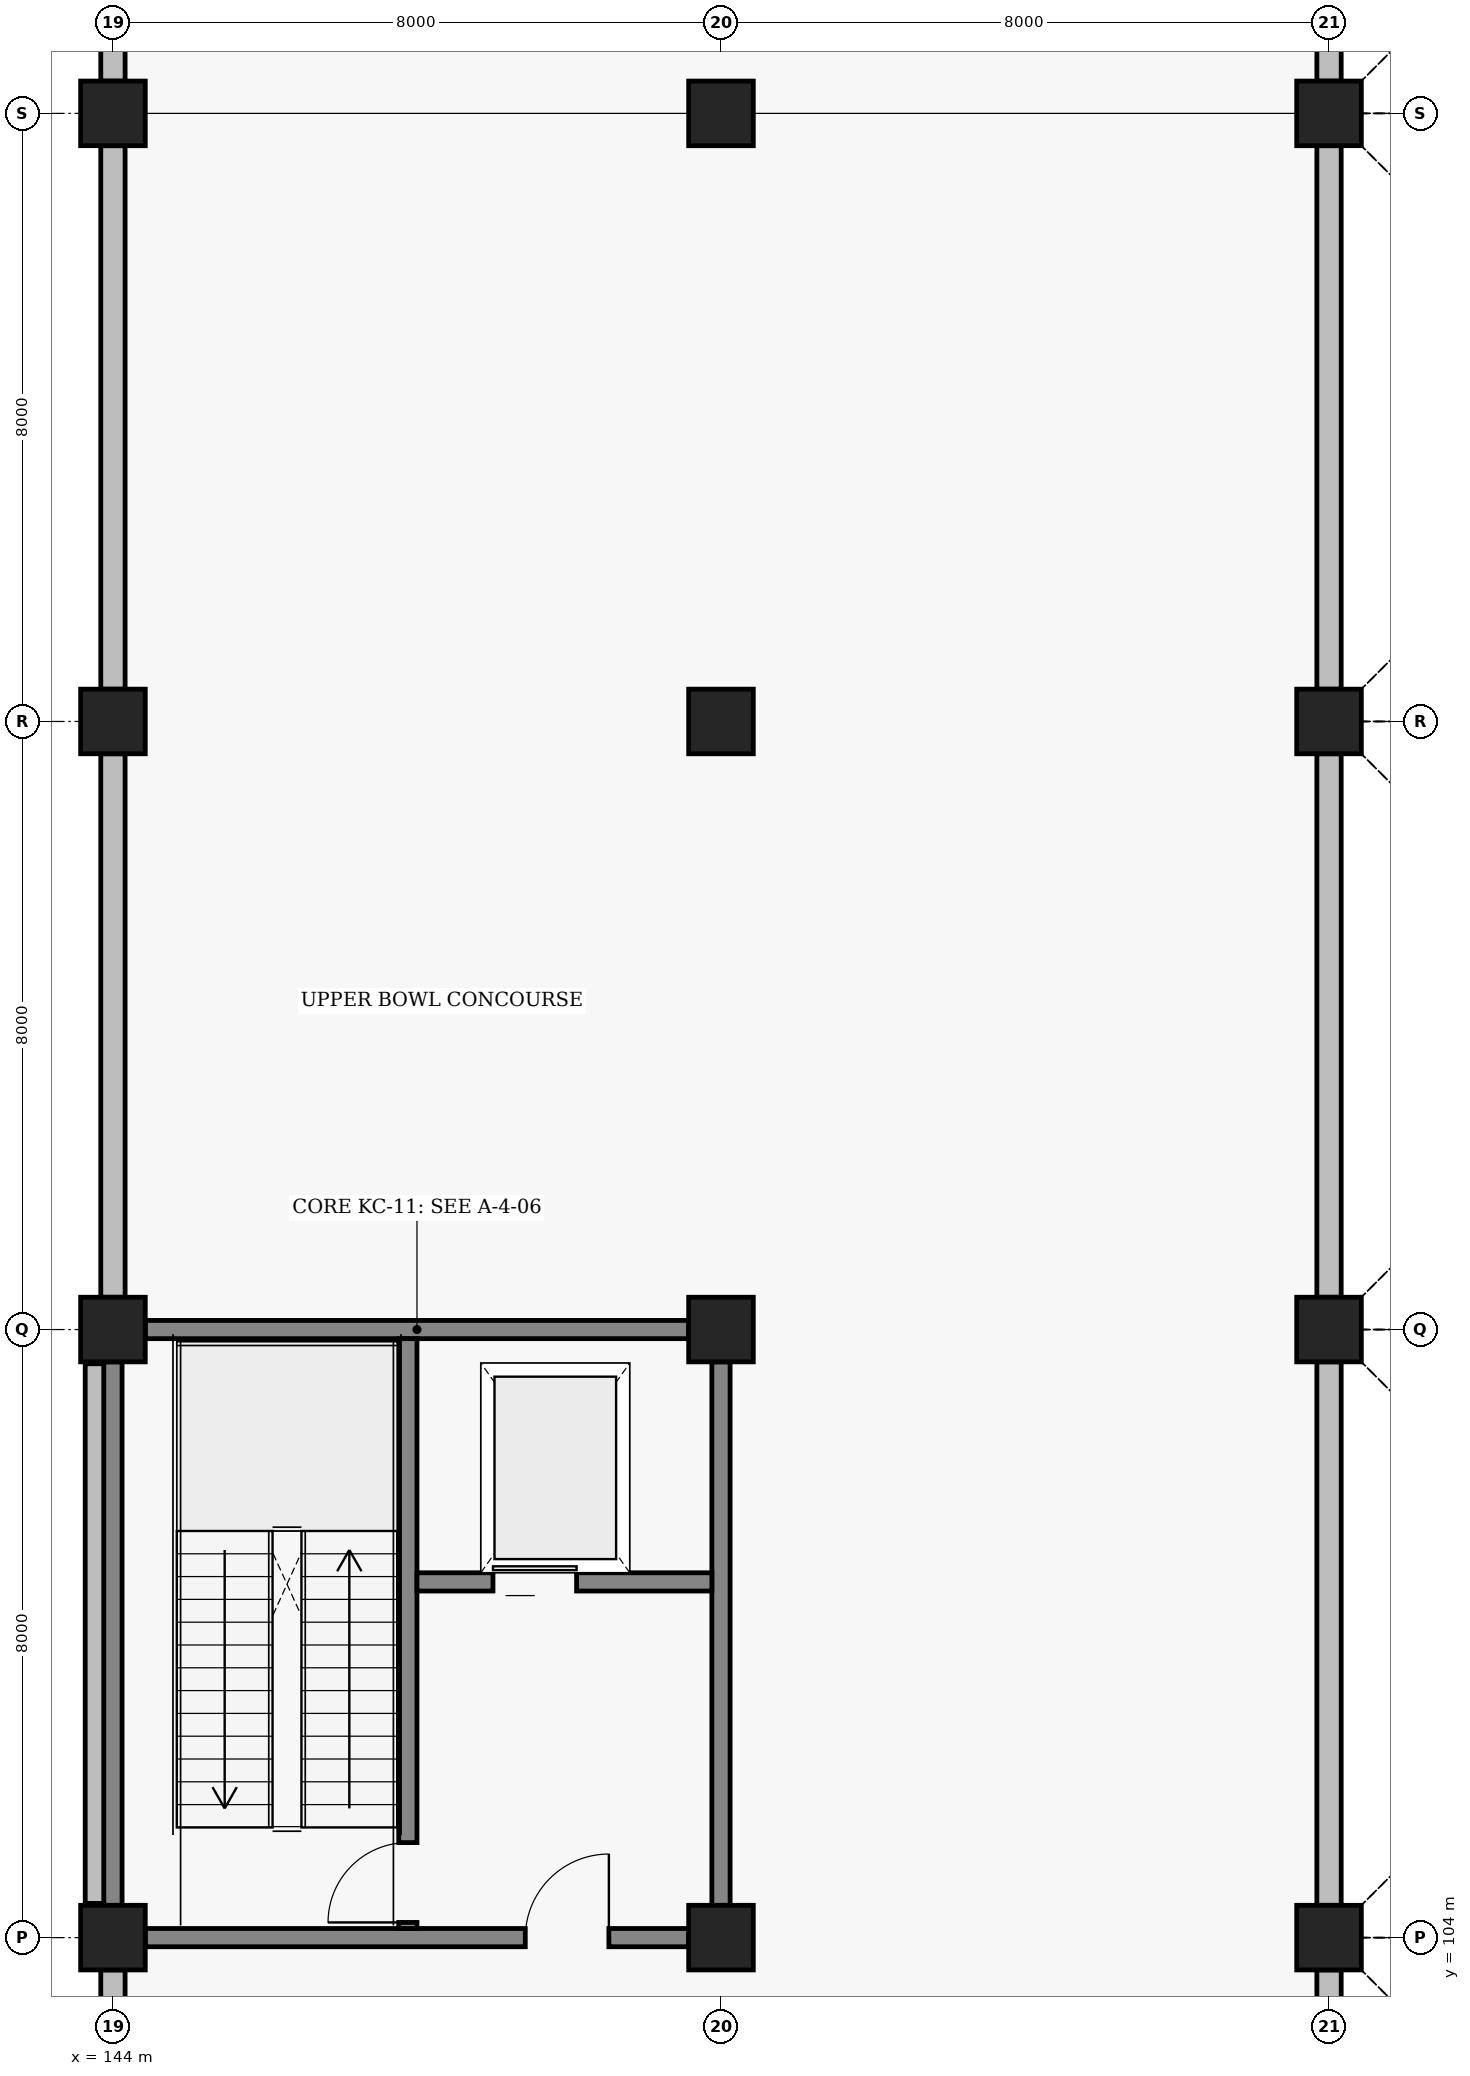
"""IFC4 building model, lengths in metres.
Left out: names, types, materials, properties, quantities, classifications, styles, units other than length and angle.
Written with IfcOpenShell. Run it as: python <this file> out.ifc"""

import sys

from ifc_helpers import new_model, si_unit, direction, frame, frame_2d, origin, origin_2d, place, context, subcontext, project, spatial, rectangle, extrude, element, fill, save


model = new_model("IFC4")
c1 = context("Model", 3, precision=1e-05, world=origin(), true_north=direction((0.0, 1.0)))
c2 = subcontext(c1, "Body", "Model", "MODEL_VIEW")
j1 = project(units=[si_unit("LENGTHUNIT", "METRE"), si_unit("PLANEANGLEUNIT", "RADIAN")], contexts=[c1])
p1 = place(None, origin())
s1 = spatial("IfcSite", under=j1, at=p1, CompositionType="ELEMENT")
p2 = place(p1, origin())
s2 = spatial("IfcBuilding", under=s1, at=p2, CompositionType="ELEMENT")
p3 = place(p2, frame((0.0, 0.0, 18.6)))
s3 = spatial("IfcBuildingStorey", under=s2, at=p3, CompositionType="ELEMENT", Elevation=18.6)
for number, where, z_axis, x_axis in (
    (1, (144.0, 104.0, 0.0), (0.0, 0.0, 1.0), (1.0, 0.0, 0.0)),
    (2, (144.0, 112.0, 0.0), (0.0, 0.0, 1.0), (1.0, 0.0, 0.0)),
    (3, (144.0, 120.0, 0.0), (0.0, 0.0, 1.0), (1.0, 0.0, 0.0)),
    (4, (144.0, 128.0, 0.0), (0.0, 0.0, 1.0), (1.0, 0.0, 0.0)),
    (5, (152.0, 104.0, 0.0), (0.0, 0.0, 1.0), (1.0, 0.0, 0.0)),
    (6, (152.0, 112.0, 0.0), (0.0, 0.0, 1.0), (1.0, 0.0, 0.0)),
    (7, (152.0, 120.0, 0.0), (0.0, 0.0, 1.0), (1.0, 0.0, 0.0)),
    (8, (152.0, 128.0, 0.0), (0.0, 0.0, 1.0), (1.0, 0.0, 0.0)),
    (9, (160.0, 104.0, 0.0), (0.0, 0.0, 1.0), (1.0, 0.0, 0.0)),
    (10, (160.0, 112.0, 0.0), (0.0, 0.0, 1.0), (1.0, 0.0, 0.0)),
    (11, (160.0, 120.0, 0.0), (0.0, 0.0, 1.0), (1.0, 0.0, 0.0)),
    (12, (160.0, 128.0, 0.0), (0.0, 0.0, 1.0), (1.0, 0.0, 0.0)),
):
    element("IfcColumn", number, at=place(p3, frame(where, z_axis=z_axis, x_axis=x_axis)), inside=s3, PredefinedType="COLUMN", context=c2, shape_type="SweptSolid", body=[
        extrude(rectangle(XDim=0.85, YDim=0.85, at=origin_2d()), origin(), (0.0, 0.0, 1.0), 4.2),
    ])
for number, where, z_axis, x_axis in (
    (13, (144.0, 96.425, 0.0), (0.0, 0.0, 1.0), (0.0, 1.0, 0.0)),
    (14, (144.0, 112.425, 0.0), (0.0, 0.0, 1.0), (0.0, 1.0, 0.0)),
    (15, (144.0, 120.425, 0.0), (0.0, 0.0, 1.0), (0.0, 1.0, 0.0)),
    (16, (144.0, 128.425, 0.0), (0.0, 0.0, 1.0), (0.0, 1.0, 0.0)),
    (17, (160.0, 96.425, 0.0), (0.0, 0.0, 1.0), (0.0, 1.0, 0.0)),
    (18, (160.0, 104.425, 0.0), (0.0, 0.0, 1.0), (0.0, 1.0, 0.0)),
    (19, (160.0, 112.425, 0.0), (0.0, 0.0, 1.0), (0.0, 1.0, 0.0)),
    (20, (160.0, 120.425, 0.0), (0.0, 0.0, 1.0), (0.0, 1.0, 0.0)),
    (21, (160.0, 128.425, 0.0), (0.0, 0.0, 1.0), (0.0, 1.0, 0.0)),
):
    element("IfcWall", number, at=place(p3, frame(where, z_axis=z_axis, x_axis=x_axis)), inside=s3, PredefinedType="SOLIDWALL", context=c2, shape_type="SweptSolid", body=[
        extrude(rectangle(XDim=7.15, YDim=0.32, at=frame_2d((3.575, 0.0))), origin(), (0.0, 0.0, 1.0), 3.34),
    ])
p4 = place(p3, frame((143.76, 104.45, 0.0), z_axis=(0.0, 0.0, 1.0), x_axis=(0.0, 1.0, 0.0)))
e22 = element("IfcWall", 22, at=p4, inside=s3, PredefinedType="PARAPET", context=c2, shape_type="SweptSolid", body=[
    extrude(rectangle(XDim=7.1, YDim=0.25, at=frame_2d((3.55, 0.0))), origin(), (0.0, 0.0, 1.0), 1.2),
])
p5 = place(p3, frame((144.425, 104.0, 0.0), z_axis=(0.0, 0.0, 1.0), x_axis=(1.0, 0.0, 0.0)))
e23 = element("IfcWall", 23, at=p5, inside=s3, PredefinedType="SHEAR", context=c2, shape_type="SweptSolid", body=[
    extrude(rectangle(XDim=7.15, YDim=0.24, at=frame_2d((3.575, 0.0))), origin(), (0.0, 0.0, 1.0), 3.34),
])
p6 = place(p5, frame((5.0, 0.0, 0.0)))
e24 = element("IfcOpeningElement", 24, at=p6, cuts=e23, PredefinedType="OPENING", context=c2, shape_type="SweptSolid", body=[
    extrude(rectangle(XDim=1.1, YDim=2.2, at=frame_2d((0.55, 1.1))), frame((0.0, 0.13, 0.0), z_axis=(0.0, -1.0, 0.0), x_axis=(1.0, 0.0, 0.0)), (0.0, 0.0, 1.0), 0.26),
])
for number, where, z_axis, x_axis in (
    (25, (144.425, 112.0, 0.0), (0.0, 0.0, 1.0), (1.0, 0.0, 0.0)),
    (26, (144.0, 104.425, 0.0), (0.0, 0.0, 1.0), (0.0, 1.0, 0.0)),
    (27, (152.0, 104.425, 0.0), (0.0, 0.0, 1.0), (0.0, 1.0, 0.0)),
):
    element("IfcWall", number, at=place(p3, frame(where, z_axis=z_axis, x_axis=x_axis)), inside=s3, PredefinedType="SHEAR", context=c2, shape_type="SweptSolid", body=[
        extrude(rectangle(XDim=7.15, YDim=0.24, at=frame_2d((3.575, 0.0))), origin(), (0.0, 0.0, 1.0), 3.34),
    ])
p7 = place(p3, frame((147.88, 104.12, 0.0), z_axis=(0.0, 0.0, 1.0), x_axis=(0.0, 1.0, 0.0)))
e28 = element("IfcWall", 28, at=p7, inside=s3, PredefinedType="SHEAR", context=c2, shape_type="SweptSolid", body=[
    extrude(rectangle(XDim=7.76, YDim=0.24, at=frame_2d((3.88, 0.0))), origin(), (0.0, 0.0, 1.0), 3.44),
])
p8 = place(p7, frame((0.08, 0.0, 0.0)))
e29 = element("IfcOpeningElement", 29, at=p8, cuts=e28, PredefinedType="OPENING", context=c2, shape_type="SweptSolid", body=[
    extrude(rectangle(XDim=1.05, YDim=2.15, at=frame_2d((0.525, 1.075))), frame((0.0, 0.13, 0.0), z_axis=(0.0, -1.0, 0.0), x_axis=(1.0, 0.0, 0.0)), (0.0, 0.0, 1.0), 0.26),
])
p9 = place(p3, frame((148.0, 108.68, 0.0), z_axis=(0.0, 0.0, 1.0), x_axis=(1.0, 0.0, 0.0)))
e30 = element("IfcWall", 30, at=p9, inside=s3, PredefinedType="SHEAR", context=c2, shape_type="SweptSolid", body=[
    extrude(rectangle(XDim=3.88, YDim=0.24, at=frame_2d((1.94, 0.0))), origin(), (0.0, 0.0, 1.0), 3.34),
])
p10 = place(p9, frame((1.0, 0.0, 0.0)))
e31 = element("IfcOpeningElement", 31, at=p10, cuts=e30, PredefinedType="OPENING", context=c2, shape_type="SweptSolid", body=[
    extrude(rectangle(XDim=1.1, YDim=2.15, at=frame_2d((0.55, 1.075))), frame((0.0, 0.13, 0.0), z_axis=(0.0, -1.0, 0.0), x_axis=(1.0, 0.0, 0.0)), (0.0, 0.0, 1.0), 0.26),
])
p11 = place(p6, origin())
e32 = element("IfcDoor", 32, at=p11, inside=s3, OperationType="SINGLE_SWING_RIGHT", PredefinedType="DOOR", context=c2, shape_type="SweptSolid", body=[
    extrude(rectangle(XDim=1.1, YDim=2.2, at=frame_2d((0.55, 1.1))), frame((0.0, 0.025, 0.0), z_axis=(0.0, -1.0, 0.0), x_axis=(1.0, 0.0, 0.0)), (0.0, 0.0, 1.0), 0.05),
])
fill(e24, e32)
p12 = place(p8, origin())
e33 = element("IfcDoor", 33, at=p12, inside=s3, OperationType="SINGLE_SWING_LEFT", PredefinedType="DOOR", context=c2, shape_type="SweptSolid", body=[
    extrude(rectangle(XDim=1.05, YDim=2.15, at=frame_2d((0.525, 1.075))), frame((0.0, 0.025, 0.0), z_axis=(0.0, -1.0, 0.0), x_axis=(1.0, 0.0, 0.0)), (0.0, 0.0, 1.0), 0.05),
])
fill(e29, e33)
p13 = place(p10, origin())
e34 = element("IfcDoor", 34, at=p13, inside=s3, OperationType="SLIDING_TO_LEFT", PredefinedType="DOOR", context=c2, shape_type="SweptSolid", body=[
    extrude(rectangle(XDim=1.1, YDim=2.15, at=frame_2d((0.55, 1.075))), frame((0.0, 0.025, 0.0), z_axis=(0.0, -1.0, 0.0), x_axis=(1.0, 0.0, 0.0)), (0.0, 0.0, 1.0), 0.05),
])
fill(e31, e34)
save(model, sys.argv[1])
